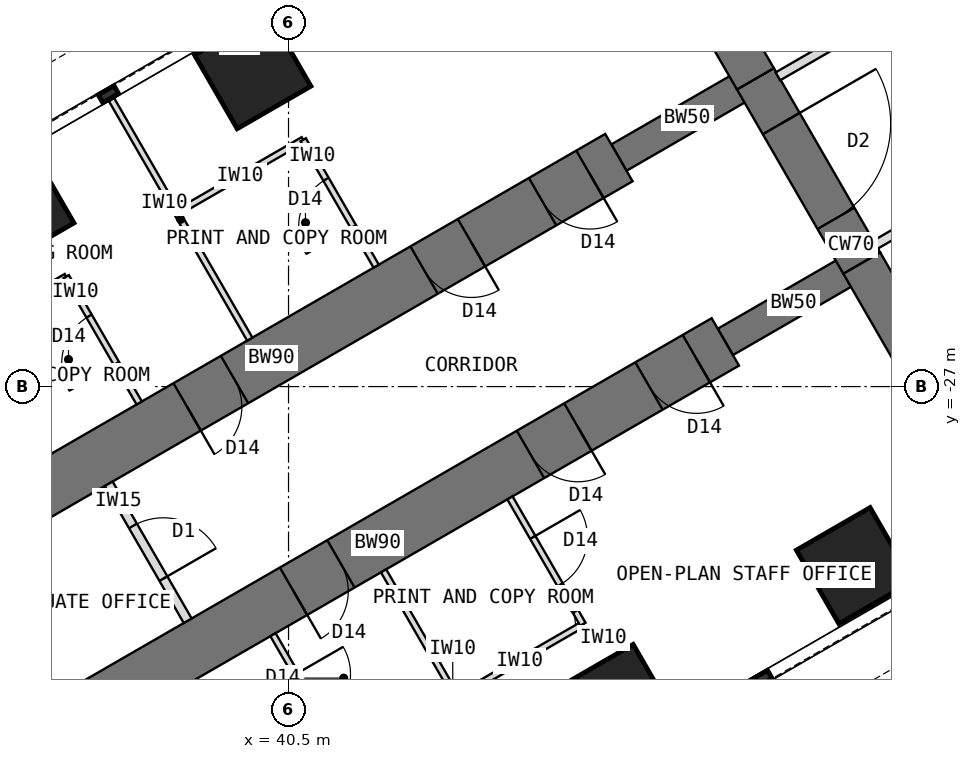
"""IFC4 building model, lengths in metres.
Left out: names, types, materials, properties, quantities, classifications, styles, units other than length and angle.
Written with IfcOpenShell. Run it as: python <this file> out.ifc"""

import sys

from ifc_helpers import new_model, si_unit, direction, frame, frame_2d, origin, origin_2d, place, context, subcontext, project, spatial, rectangle, extrude, element, fill, save


model = new_model("IFC4")
c1 = context("Model", 3, precision=1e-05, world=origin(), true_north=direction((0.0, 1.0)))
c2 = subcontext(c1, "Body", "Model", "MODEL_VIEW")
j1 = project(units=[si_unit("LENGTHUNIT", "METRE"), si_unit("PLANEANGLEUNIT", "RADIAN")], contexts=[c1])
p1 = place(None, origin())
s1 = spatial("IfcSite", under=j1, at=p1, CompositionType="ELEMENT")
p2 = place(p1, origin())
s2 = spatial("IfcBuilding", under=s1, at=p2, CompositionType="ELEMENT")
p3 = place(p2, frame((0.0, 0.0, 80.5)))
s3 = spatial("IfcBuildingStorey", under=s2, at=p3, CompositionType="ELEMENT", Elevation=80.5)
p4 = place(p3, frame((45.904, -18.0, 0.0), z_axis=(0.0, 0.0, 1.0), x_axis=(0.500024481964, -0.866011268655, 0.0)))
e1 = element("IfcWall", 1, at=p4, inside=s3, PredefinedType="SHEAR", context=c2, shape_type="SweptSolid", body=[
    extrude(rectangle(XDim=4.548, YDim=0.7, at=frame_2d((2.274, 0.0))), origin(), (0.0, 0.0, 1.0), 4.0),
])
p5 = place(p3, frame((48.178, -21.939, 0.0), z_axis=(0.0, 0.0, 1.0), x_axis=(0.500010275428, -0.866019471182, 0.0)))
e2 = element("IfcWall", 2, at=p5, inside=s3, PredefinedType="SHEAR", context=c2, shape_type="SweptSolid", body=[
    extrude(rectangle(XDim=3.5, YDim=0.7, at=frame_2d((1.75, 0.0))), origin(), (0.0, 0.0, 1.0), 4.0),
])
p6 = place(p5, frame((0.85, 0.0, 0.0)))
e3 = element("IfcOpeningElement", 3, at=p6, cuts=e2, PredefinedType="OPENING", context=c2, shape_type="SweptSolid", body=[
    extrude(rectangle(XDim=1.8, YDim=2.1, at=frame_2d((0.9, 1.05))), frame((0.0, 0.36, 0.0), z_axis=(0.0, -1.0, 0.0), x_axis=(1.0, 0.0, 0.0)), (0.0, 0.0, 1.0), 0.72),
])
p7 = place(p3, frame((49.928, -24.97, 0.0), z_axis=(0.0, 0.0, 1.0), x_axis=(0.499984222037, -0.866034513004, 0.0)))
e4 = element("IfcWall", 4, at=p7, inside=s3, PredefinedType="SHEAR", context=c2, shape_type="SweptSolid", body=[
    extrude(rectangle(XDim=4.548, YDim=0.7, at=frame_2d((2.274, 0.0))), origin(), (0.0, 0.0, 1.0), 4.0),
])
p8 = place(p3, frame((49.928, -24.97, 0.0), z_axis=(0.0, 0.0, 1.0), x_axis=(-0.866031863473, -0.499988811324, 0.0)))
e5 = element("IfcWall", 5, at=p8, inside=s3, PredefinedType="SHEAR", context=c2, shape_type="SweptSolid", body=[
    extrude(rectangle(XDim=2.592, YDim=0.5, at=frame_2d((1.296, 0.0))), origin(), (0.0, 0.0, 1.0), 4.0),
])
p9 = place(p3, frame((47.684, -26.266, 0.0), z_axis=(0.0, 0.0, 1.0), x_axis=(-0.866027579429, -0.499996231654, 0.0)))
e6 = element("IfcWall", 6, at=p9, inside=s3, PredefinedType="SHEAR", context=c2, shape_type="SweptSolid", body=[
    extrude(rectangle(XDim=13.2, YDim=0.9, at=frame_2d((6.6, 0.0))), origin(), (0.0, 0.0, 1.0), 4.0),
])
p10 = place(p9, frame((0.55, 0.0, 0.0)))
e7 = element("IfcOpeningElement", 7, at=p10, cuts=e6, PredefinedType="OPENING", context=c2, shape_type="SweptSolid", body=[
    extrude(rectangle(XDim=0.9, YDim=2.1, at=frame_2d((0.45, 1.05))), frame((0.0, 0.46, 0.0), z_axis=(0.0, -1.0, 0.0), x_axis=(1.0, 0.0, 0.0)), (0.0, 0.0, 1.0), 0.92),
])
p11 = place(p9, frame((2.8, 0.0, 0.0)))
e8 = element("IfcOpeningElement", 8, at=p11, cuts=e6, PredefinedType="OPENING", context=c2, shape_type="SweptSolid", body=[
    extrude(rectangle(XDim=0.9, YDim=2.1, at=frame_2d((0.45, 1.05))), frame((0.0, 0.46, 0.0), z_axis=(0.0, -1.0, 0.0), x_axis=(1.0, 0.0, 0.0)), (0.0, 0.0, 1.0), 0.92),
])
p12 = place(p9, frame((7.3, 0.0, 0.0)))
e9 = element("IfcOpeningElement", 9, at=p12, cuts=e6, PredefinedType="OPENING", context=c2, shape_type="SweptSolid", body=[
    extrude(rectangle(XDim=0.9, YDim=2.1, at=frame_2d((0.45, 1.05))), frame((0.0, 0.46, 0.0), z_axis=(0.0, -1.0, 0.0), x_axis=(1.0, 0.0, 0.0)), (0.0, 0.0, 1.0), 0.92),
])
p13 = place(p3, frame((48.178, -21.939, 0.0), z_axis=(0.0, 0.0, 1.0), x_axis=(-0.866072649678, -0.499918158782, 0.0)))
e10 = element("IfcWall", 10, at=p13, inside=s3, PredefinedType="SHEAR", context=c2, shape_type="SweptSolid", body=[
    extrude(rectangle(XDim=2.592, YDim=0.5, at=frame_2d((1.296, 0.0))), origin(), (0.0, 0.0, 1.0), 4.0),
])
p14 = place(p3, frame((45.934, -23.234, 0.0), z_axis=(0.0, 0.0, 1.0), x_axis=(-0.866019570528, -0.500010103361, 0.0)))
e11 = element("IfcWall", 11, at=p14, inside=s3, PredefinedType="SHEAR", context=c2, shape_type="SweptSolid", body=[
    extrude(rectangle(XDim=13.2, YDim=0.9, at=frame_2d((6.6, 0.0))), origin(), (0.0, 0.0, 1.0), 4.0),
])
p15 = place(p14, frame((0.55, 0.0, 0.0)))
e12 = element("IfcOpeningElement", 12, at=p15, cuts=e11, PredefinedType="OPENING", context=c2, shape_type="SweptSolid", body=[
    extrude(rectangle(XDim=0.9, YDim=2.1, at=frame_2d((0.45, 1.05))), frame((0.0, 0.46, 0.0), z_axis=(0.0, -1.0, 0.0), x_axis=(1.0, 0.0, 0.0)), (0.0, 0.0, 1.0), 0.92),
])
p16 = place(p14, frame((2.8, 0.0, 0.0)))
e13 = element("IfcOpeningElement", 13, at=p16, cuts=e11, PredefinedType="OPENING", context=c2, shape_type="SweptSolid", body=[
    extrude(rectangle(XDim=0.9, YDim=2.1, at=frame_2d((0.45, 1.05))), frame((0.0, 0.46, 0.0), z_axis=(0.0, -1.0, 0.0), x_axis=(1.0, 0.0, 0.0)), (0.0, 0.0, 1.0), 0.92),
])
p17 = place(p14, frame((7.3, 0.0, 0.0)))
e14 = element("IfcOpeningElement", 14, at=p17, cuts=e11, PredefinedType="OPENING", context=c2, shape_type="SweptSolid", body=[
    extrude(rectangle(XDim=0.9, YDim=2.1, at=frame_2d((0.45, 1.05))), frame((0.0, 0.46, 0.0), z_axis=(0.0, -1.0, 0.0), x_axis=(1.0, 0.0, 0.0)), (0.0, 0.0, 1.0), 0.92),
])
for number, where, z_axis, x_axis in (
    (15, (49.809, -29.946, 0.0), (0.0, 0.0, 1.0), (0.866, 0.5, 0.0)),
    (16, (45.912, -32.196, 0.0), (0.0, 0.0, 1.0), (0.866, 0.5, 0.0)),
    (17, (39.912, -21.804, 0.0), (0.0, 0.0, 1.0), (0.866, 0.5, 0.0)),
    (18, (36.014, -24.054, 0.0), (0.0, 0.0, 1.0), (0.866, 0.5, 0.0)),
):
    element("IfcColumn", number, at=place(p3, frame(where, z_axis=z_axis, x_axis=x_axis)), inside=s3, PredefinedType="COLUMN", context=c2, shape_type="SweptSolid", body=[
        extrude(rectangle(XDim=1.4, YDim=1.4, at=origin_2d()), origin(), (0.0, 0.0, 1.0), 4.0),
    ])
p18 = place(p3, frame((42.063, -30.03, 0.0), z_axis=(0.0, 0.0, 1.0), x_axis=(0.499982560684, -0.866035472144, 0.0)))
e19 = element("IfcWall", 19, at=p18, inside=s3, PredefinedType="PARTITIONING", context=c2, shape_type="SweptSolid", body=[
    extrude(rectangle(XDim=4.55, YDim=0.1, at=frame_2d((2.275, 0.0))), origin(), (0.0, 0.0, 1.0), 3.8),
])
p19 = place(p3, frame((45.342, -30.909, 0.0), z_axis=(0.0, 0.0, 1.0), x_axis=(-0.866050077142, -0.499957262057, 0.0)))
e20 = element("IfcWall", 20, at=p19, inside=s3, PredefinedType="PARTITIONING", context=c2, shape_type="SweptSolid", body=[
    extrude(rectangle(XDim=2.4, YDim=0.1, at=frame_2d((1.2, 0.0))), origin(), (0.0, 0.0, 1.0), 3.8),
])
p20 = place(p3, frame((44.141, -28.83, 0.0), z_axis=(0.0, 0.0, 1.0), x_axis=(0.500077600433, -0.865980596518, 0.0)))
e21 = element("IfcWall", 21, at=p20, inside=s3, PredefinedType="PARTITIONING", context=c2, shape_type="SweptSolid", body=[
    extrude(rectangle(XDim=2.4, YDim=0.1, at=frame_2d((1.2, 0.0))), origin(), (0.0, 0.0, 1.0), 3.8),
])
p21 = place(p20, frame((0.75, 0.0, 0.0)))
e22 = element("IfcOpeningElement", 22, at=p21, cuts=e21, PredefinedType="OPENING", context=c2, shape_type="SweptSolid", body=[
    extrude(rectangle(XDim=0.9, YDim=2.1, at=frame_2d((0.45, 1.05))), frame((0.0, 0.06, 0.0), z_axis=(0.0, -1.0, 0.0), x_axis=(1.0, 0.0, 0.0)), (0.0, 0.0, 1.0), 0.12),
])
p22 = place(p3, frame((40.244, -31.08, 0.0), z_axis=(0.0, 0.0, 1.0), x_axis=(0.500001309137, -0.866024647952, 0.0)))
e23 = element("IfcWall", 23, at=p22, inside=s3, PredefinedType="PARTITIONING", context=c2, shape_type="SweptSolid", body=[
    extrude(rectangle(XDim=2.4, YDim=0.1, at=frame_2d((1.2, 0.0))), origin(), (0.0, 0.0, 1.0), 3.8),
])
p23 = place(p22, frame((0.75, 0.0, 0.0)))
e24 = element("IfcOpeningElement", 24, at=p23, cuts=e23, PredefinedType="OPENING", context=c2, shape_type="SweptSolid", body=[
    extrude(rectangle(XDim=0.9, YDim=2.1, at=frame_2d((0.45, 1.05))), frame((0.0, 0.06, 0.0), z_axis=(0.0, -1.0, 0.0), x_axis=(1.0, 0.0, 0.0)), (0.0, 0.0, 1.0), 0.12),
])
p24 = place(p3, frame((39.863, -26.22, 0.0), z_axis=(0.0, 0.0, 1.0), x_axis=(-0.500022803284, 0.866012237902, 0.0)))
e25 = element("IfcWall", 25, at=p24, inside=s3, PredefinedType="PARTITIONING", context=c2, shape_type="SweptSolid", body=[
    extrude(rectangle(XDim=4.55, YDim=0.1, at=frame_2d((2.275, 0.0))), origin(), (0.0, 0.0, 1.0), 3.8),
])
p25 = place(p3, frame((40.741, -22.941, 0.0), z_axis=(0.0, 0.0, 1.0), x_axis=(-0.865980596518, -0.500077600433, 0.0)))
e26 = element("IfcWall", 26, at=p25, inside=s3, PredefinedType="PARTITIONING", context=c2, shape_type="SweptSolid", body=[
    extrude(rectangle(XDim=2.4, YDim=0.1, at=frame_2d((1.2, 0.0))), origin(), (0.0, 0.0, 1.0), 3.8),
])
p26 = place(p3, frame((41.941, -25.02, 0.0), z_axis=(0.0, 0.0, 1.0), x_axis=(-0.499957262057, 0.866050077142, 0.0)))
e27 = element("IfcWall", 27, at=p26, inside=s3, PredefinedType="PARTITIONING", context=c2, shape_type="SweptSolid", body=[
    extrude(rectangle(XDim=2.4, YDim=0.1, at=frame_2d((1.2, 0.0))), origin(), (0.0, 0.0, 1.0), 3.8),
])
p27 = place(p26, frame((0.75, 0.0, 0.0)))
e28 = element("IfcOpeningElement", 28, at=p27, cuts=e27, PredefinedType="OPENING", context=c2, shape_type="SweptSolid", body=[
    extrude(rectangle(XDim=0.9, YDim=2.1, at=frame_2d((0.45, 1.05))), frame((0.0, 0.06, 0.0), z_axis=(0.0, -1.0, 0.0), x_axis=(1.0, 0.0, 0.0)), (0.0, 0.0, 1.0), 0.12),
])
p28 = place(p3, frame((36.844, -25.191, 0.0), z_axis=(0.0, 0.0, 1.0), x_axis=(-0.865980596518, -0.500077600433, 0.0)))
e29 = element("IfcWall", 29, at=p28, inside=s3, PredefinedType="PARTITIONING", context=c2, shape_type="SweptSolid", body=[
    extrude(rectangle(XDim=2.4, YDim=0.1, at=frame_2d((1.2, 0.0))), origin(), (0.0, 0.0, 1.0), 3.8),
])
p29 = place(p3, frame((38.044, -27.27, 0.0), z_axis=(0.0, 0.0, 1.0), x_axis=(-0.500033551112, 0.866006032174, 0.0)))
e30 = element("IfcWall", 30, at=p29, inside=s3, PredefinedType="PARTITIONING", context=c2, shape_type="SweptSolid", body=[
    extrude(rectangle(XDim=2.4, YDim=0.1, at=frame_2d((1.2, 0.0))), origin(), (0.0, 0.0, 1.0), 3.8),
])
p30 = place(p29, frame((0.75, 0.0, 0.0)))
e31 = element("IfcOpeningElement", 31, at=p30, cuts=e30, PredefinedType="OPENING", context=c2, shape_type="SweptSolid", body=[
    extrude(rectangle(XDim=0.9, YDim=2.1, at=frame_2d((0.45, 1.05))), frame((0.0, 0.06, 0.0), z_axis=(0.0, -1.0, 0.0), x_axis=(1.0, 0.0, 0.0)), (0.0, 0.0, 1.0), 0.12),
])
p31 = place(p3, frame((54.017, -22.436, 0.0), z_axis=(0.0, 0.0, 1.0), x_axis=(-0.866015446554, -0.500017246033, 0.0)))
e32 = element("IfcWall", 32, at=p31, inside=s3, PredefinedType="PARTITIONING", context=c2, shape_type="SweptSolid", body=[
    extrude(rectangle(XDim=4.469, YDim=0.15, at=frame_2d((2.234, 0.0))), origin(), (0.0, 0.0, 1.0), 3.8),
])
p32 = place(p31, frame((1.744, 0.0, 0.0)))
e33 = element("IfcOpeningElement", 33, at=p32, cuts=e32, PredefinedType="OPENING", context=c2, shape_type="SweptSolid", body=[
    extrude(rectangle(XDim=1.0, YDim=2.1, at=frame_2d((0.5, 1.05))), frame((0.0, 0.085, 0.0), z_axis=(0.0, -1.0, 0.0), x_axis=(1.0, 0.0, 0.0)), (0.0, 0.0, 1.0), 0.17),
])
p33 = place(p3, frame((48.548, -21.898, 0.0), z_axis=(0.0, 0.0, 1.0), x_axis=(0.866025445582, 0.499999927604, 0.0)))
e34 = element("IfcWall", 34, at=p33, inside=s3, PredefinedType="PARTITIONING", context=c2, shape_type="SweptSolid", body=[
    extrude(rectangle(XDim=4.468, YDim=0.15, at=frame_2d((2.234, 0.0))), origin(), (0.0, 0.0, 1.0), 3.8),
])
p34 = place(p33, frame((1.724, 0.0, 0.0)))
e35 = element("IfcOpeningElement", 35, at=p34, cuts=e34, PredefinedType="OPENING", context=c2, shape_type="SweptSolid", body=[
    extrude(rectangle(XDim=1.0, YDim=2.1, at=frame_2d((0.5, 1.05))), frame((0.0, 0.085, 0.0), z_axis=(0.0, -1.0, 0.0), x_axis=(1.0, 0.0, 0.0)), (0.0, 0.0, 1.0), 0.17),
])
p35 = place(p3, frame((37.542, -28.599, 0.0), z_axis=(0.0, 0.0, 1.0), x_axis=(0.500006934395, -0.866021400173, 0.0)))
e36 = element("IfcWall", 36, at=p35, inside=s3, PredefinedType="PARTITIONING", context=c2, shape_type="SweptSolid", body=[
    extrude(rectangle(XDim=2.6, YDim=0.15, at=frame_2d((1.3, 0.0))), origin(), (0.0, 0.0, 1.0), 3.8),
])
p36 = place(p35, frame((0.8, 0.0, 0.0)))
e37 = element("IfcOpeningElement", 37, at=p36, cuts=e36, PredefinedType="OPENING", context=c2, shape_type="SweptSolid", body=[
    extrude(rectangle(XDim=1.0, YDim=2.1, at=frame_2d((0.5, 1.05))), frame((0.0, 0.085, 0.0), z_axis=(0.0, -1.0, 0.0), x_axis=(1.0, 0.0, 0.0)), (0.0, 0.0, 1.0), 0.17),
])
p37 = place(p6, origin())
e38 = element("IfcDoor", 38, at=p37, inside=s3, OperationType="DOUBLE_DOOR_DOUBLE_SWING", PredefinedType="DOOR", context=c2, shape_type="SweptSolid", body=[
    extrude(rectangle(XDim=1.72, YDim=2.06, at=frame_2d((0.9, 1.03))), frame((0.0, 0.025, 0.0), z_axis=(0.0, -1.0, 0.0), x_axis=(1.0, 0.0, 0.0)), (0.0, 0.0, 1.0), 0.05),
    extrude(rectangle(XDim=0.04, YDim=2.1, at=frame_2d((0.02, 1.05))), frame((0.0, 0.35, 0.0), z_axis=(0.0, -1.0, 0.0), x_axis=(1.0, 0.0, 0.0)), (0.0, 0.0, 1.0), 0.699),
    extrude(rectangle(XDim=0.04, YDim=2.1, at=frame_2d((1.78, 1.05))), frame((0.0, 0.35, 0.0), z_axis=(0.0, -1.0, 0.0), x_axis=(1.0, 0.0, 0.0)), (0.0, 0.0, 1.0), 0.699),
    extrude(rectangle(XDim=1.72, YDim=0.04, at=frame_2d((0.9, 2.08))), frame((0.0, 0.35, 0.0), z_axis=(0.0, -1.0, 0.0), x_axis=(1.0, 0.0, 0.0)), (0.0, 0.0, 1.0), 0.699),
])
fill(e3, e38)
p38 = place(p21, origin())
e39 = element("IfcDoor", 39, at=p38, inside=s3, OperationType="SINGLE_SWING_LEFT", PredefinedType="DOOR", context=c2, shape_type="SweptSolid", body=[
    extrude(rectangle(XDim=0.9, YDim=2.1, at=frame_2d((0.45, 1.05))), frame((0.0, 0.025, 0.0), z_axis=(0.0, -1.0, 0.0), x_axis=(1.0, 0.0, 0.0)), (0.0, 0.0, 1.0), 0.05),
])
fill(e22, e39)
p39 = place(p23, origin())
e40 = element("IfcDoor", 40, at=p39, inside=s3, OperationType="SINGLE_SWING_LEFT", PredefinedType="DOOR", context=c2, shape_type="SweptSolid", body=[
    extrude(rectangle(XDim=0.9, YDim=2.1, at=frame_2d((0.45, 1.05))), frame((0.0, 0.025, 0.0), z_axis=(0.0, -1.0, 0.0), x_axis=(1.0, 0.0, 0.0)), (0.0, 0.0, 1.0), 0.05),
])
fill(e24, e40)
p40 = place(p27, origin())
e41 = element("IfcDoor", 41, at=p40, inside=s3, OperationType="SINGLE_SWING_LEFT", PredefinedType="DOOR", context=c2, shape_type="SweptSolid", body=[
    extrude(rectangle(XDim=0.9, YDim=2.1, at=frame_2d((0.45, 1.05))), frame((0.0, 0.025, 0.0), z_axis=(0.0, -1.0, 0.0), x_axis=(1.0, 0.0, 0.0)), (0.0, 0.0, 1.0), 0.05),
])
fill(e28, e41)
p41 = place(p30, origin())
e42 = element("IfcDoor", 42, at=p41, inside=s3, OperationType="SINGLE_SWING_LEFT", PredefinedType="DOOR", context=c2, shape_type="SweptSolid", body=[
    extrude(rectangle(XDim=0.9, YDim=2.1, at=frame_2d((0.45, 1.05))), frame((0.0, 0.025, 0.0), z_axis=(0.0, -1.0, 0.0), x_axis=(1.0, 0.0, 0.0)), (0.0, 0.0, 1.0), 0.05),
])
fill(e31, e42)
p42 = place(p36, origin())
e43 = element("IfcDoor", 43, at=p42, inside=s3, OperationType="SINGLE_SWING_RIGHT", PredefinedType="DOOR", context=c2, shape_type="SweptSolid", body=[
    extrude(rectangle(XDim=1.0, YDim=2.1, at=frame_2d((0.5, 1.05))), frame((0.0, 0.025, 0.0), z_axis=(0.0, -1.0, 0.0), x_axis=(1.0, 0.0, 0.0)), (0.0, 0.0, 1.0), 0.05),
])
fill(e37, e43)
p43 = place(p10, origin())
e44 = element("IfcDoor", 44, at=p43, inside=s3, OperationType="SINGLE_SWING_LEFT", PredefinedType="DOOR", context=c2, shape_type="SweptSolid", body=[
    extrude(rectangle(XDim=0.82, YDim=2.06, at=frame_2d((0.45, 1.03))), frame((0.0, 0.025, 0.0), z_axis=(0.0, -1.0, 0.0), x_axis=(1.0, 0.0, 0.0)), (0.0, 0.0, 1.0), 0.05),
    extrude(rectangle(XDim=0.04, YDim=2.1, at=frame_2d((0.02, 1.05))), frame((0.0, 0.45, 0.0), z_axis=(0.0, -1.0, 0.0), x_axis=(1.0, 0.0, 0.0)), (0.0, 0.0, 1.0), 0.899),
    extrude(rectangle(XDim=0.04, YDim=2.1, at=frame_2d((0.88, 1.05))), frame((0.0, 0.45, 0.0), z_axis=(0.0, -1.0, 0.0), x_axis=(1.0, 0.0, 0.0)), (0.0, 0.0, 1.0), 0.899),
    extrude(rectangle(XDim=0.82, YDim=0.04, at=frame_2d((0.45, 2.08))), frame((0.0, 0.45, 0.0), z_axis=(0.0, -1.0, 0.0), x_axis=(1.0, 0.0, 0.0)), (0.0, 0.0, 1.0), 0.899),
])
fill(e7, e44)
p44 = place(p11, origin())
e45 = element("IfcDoor", 45, at=p44, inside=s3, OperationType="SINGLE_SWING_LEFT", PredefinedType="DOOR", context=c2, shape_type="SweptSolid", body=[
    extrude(rectangle(XDim=0.82, YDim=2.06, at=frame_2d((0.45, 1.03))), frame((0.0, 0.025, 0.0), z_axis=(0.0, -1.0, 0.0), x_axis=(1.0, 0.0, 0.0)), (0.0, 0.0, 1.0), 0.05),
    extrude(rectangle(XDim=0.04, YDim=2.1, at=frame_2d((0.02, 1.05))), frame((0.0, 0.45, 0.0), z_axis=(0.0, -1.0, 0.0), x_axis=(1.0, 0.0, 0.0)), (0.0, 0.0, 1.0), 0.899),
    extrude(rectangle(XDim=0.04, YDim=2.1, at=frame_2d((0.88, 1.05))), frame((0.0, 0.45, 0.0), z_axis=(0.0, -1.0, 0.0), x_axis=(1.0, 0.0, 0.0)), (0.0, 0.0, 1.0), 0.899),
    extrude(rectangle(XDim=0.82, YDim=0.04, at=frame_2d((0.45, 2.08))), frame((0.0, 0.45, 0.0), z_axis=(0.0, -1.0, 0.0), x_axis=(1.0, 0.0, 0.0)), (0.0, 0.0, 1.0), 0.899),
])
fill(e8, e45)
p45 = place(p12, origin())
e46 = element("IfcDoor", 46, at=p45, inside=s3, OperationType="SINGLE_SWING_RIGHT", PredefinedType="DOOR", context=c2, shape_type="SweptSolid", body=[
    extrude(rectangle(XDim=0.82, YDim=2.06, at=frame_2d((0.45, 1.03))), frame((0.0, 0.025, 0.0), z_axis=(0.0, -1.0, 0.0), x_axis=(1.0, 0.0, 0.0)), (0.0, 0.0, 1.0), 0.05),
    extrude(rectangle(XDim=0.04, YDim=2.1, at=frame_2d((0.02, 1.05))), frame((0.0, 0.45, 0.0), z_axis=(0.0, -1.0, 0.0), x_axis=(1.0, 0.0, 0.0)), (0.0, 0.0, 1.0), 0.899),
    extrude(rectangle(XDim=0.04, YDim=2.1, at=frame_2d((0.88, 1.05))), frame((0.0, 0.45, 0.0), z_axis=(0.0, -1.0, 0.0), x_axis=(1.0, 0.0, 0.0)), (0.0, 0.0, 1.0), 0.899),
    extrude(rectangle(XDim=0.82, YDim=0.04, at=frame_2d((0.45, 2.08))), frame((0.0, 0.45, 0.0), z_axis=(0.0, -1.0, 0.0), x_axis=(1.0, 0.0, 0.0)), (0.0, 0.0, 1.0), 0.899),
])
fill(e9, e46)
p46 = place(p15, origin())
e47 = element("IfcDoor", 47, at=p46, inside=s3, OperationType="SINGLE_SWING_LEFT", PredefinedType="DOOR", context=c2, shape_type="SweptSolid", body=[
    extrude(rectangle(XDim=0.82, YDim=2.06, at=frame_2d((0.45, 1.03))), frame((0.0, 0.025, 0.0), z_axis=(0.0, -1.0, 0.0), x_axis=(1.0, 0.0, 0.0)), (0.0, 0.0, 1.0), 0.05),
    extrude(rectangle(XDim=0.04, YDim=2.1, at=frame_2d((0.02, 1.05))), frame((0.0, 0.45, 0.0), z_axis=(0.0, -1.0, 0.0), x_axis=(1.0, 0.0, 0.0)), (0.0, 0.0, 1.0), 0.899),
    extrude(rectangle(XDim=0.04, YDim=2.1, at=frame_2d((0.88, 1.05))), frame((0.0, 0.45, 0.0), z_axis=(0.0, -1.0, 0.0), x_axis=(1.0, 0.0, 0.0)), (0.0, 0.0, 1.0), 0.899),
    extrude(rectangle(XDim=0.82, YDim=0.04, at=frame_2d((0.45, 2.08))), frame((0.0, 0.45, 0.0), z_axis=(0.0, -1.0, 0.0), x_axis=(1.0, 0.0, 0.0)), (0.0, 0.0, 1.0), 0.899),
])
fill(e12, e47)
p47 = place(p16, origin())
e48 = element("IfcDoor", 48, at=p47, inside=s3, OperationType="SINGLE_SWING_LEFT", PredefinedType="DOOR", context=c2, shape_type="SweptSolid", body=[
    extrude(rectangle(XDim=0.82, YDim=2.06, at=frame_2d((0.45, 1.03))), frame((0.0, 0.025, 0.0), z_axis=(0.0, -1.0, 0.0), x_axis=(1.0, 0.0, 0.0)), (0.0, 0.0, 1.0), 0.05),
    extrude(rectangle(XDim=0.04, YDim=2.1, at=frame_2d((0.02, 1.05))), frame((0.0, 0.45, 0.0), z_axis=(0.0, -1.0, 0.0), x_axis=(1.0, 0.0, 0.0)), (0.0, 0.0, 1.0), 0.899),
    extrude(rectangle(XDim=0.04, YDim=2.1, at=frame_2d((0.88, 1.05))), frame((0.0, 0.45, 0.0), z_axis=(0.0, -1.0, 0.0), x_axis=(1.0, 0.0, 0.0)), (0.0, 0.0, 1.0), 0.899),
    extrude(rectangle(XDim=0.82, YDim=0.04, at=frame_2d((0.45, 2.08))), frame((0.0, 0.45, 0.0), z_axis=(0.0, -1.0, 0.0), x_axis=(1.0, 0.0, 0.0)), (0.0, 0.0, 1.0), 0.899),
])
fill(e13, e48)
p48 = place(p17, origin())
e49 = element("IfcDoor", 49, at=p48, inside=s3, OperationType="SINGLE_SWING_RIGHT", PredefinedType="DOOR", context=c2, shape_type="SweptSolid", body=[
    extrude(rectangle(XDim=0.82, YDim=2.06, at=frame_2d((0.45, 1.03))), frame((0.0, 0.025, 0.0), z_axis=(0.0, -1.0, 0.0), x_axis=(1.0, 0.0, 0.0)), (0.0, 0.0, 1.0), 0.05),
    extrude(rectangle(XDim=0.04, YDim=2.1, at=frame_2d((0.02, 1.05))), frame((0.0, 0.45, 0.0), z_axis=(0.0, -1.0, 0.0), x_axis=(1.0, 0.0, 0.0)), (0.0, 0.0, 1.0), 0.899),
    extrude(rectangle(XDim=0.04, YDim=2.1, at=frame_2d((0.88, 1.05))), frame((0.0, 0.45, 0.0), z_axis=(0.0, -1.0, 0.0), x_axis=(1.0, 0.0, 0.0)), (0.0, 0.0, 1.0), 0.899),
    extrude(rectangle(XDim=0.82, YDim=0.04, at=frame_2d((0.45, 2.08))), frame((0.0, 0.45, 0.0), z_axis=(0.0, -1.0, 0.0), x_axis=(1.0, 0.0, 0.0)), (0.0, 0.0, 1.0), 0.899),
])
fill(e14, e49)
save(model, sys.argv[1])
